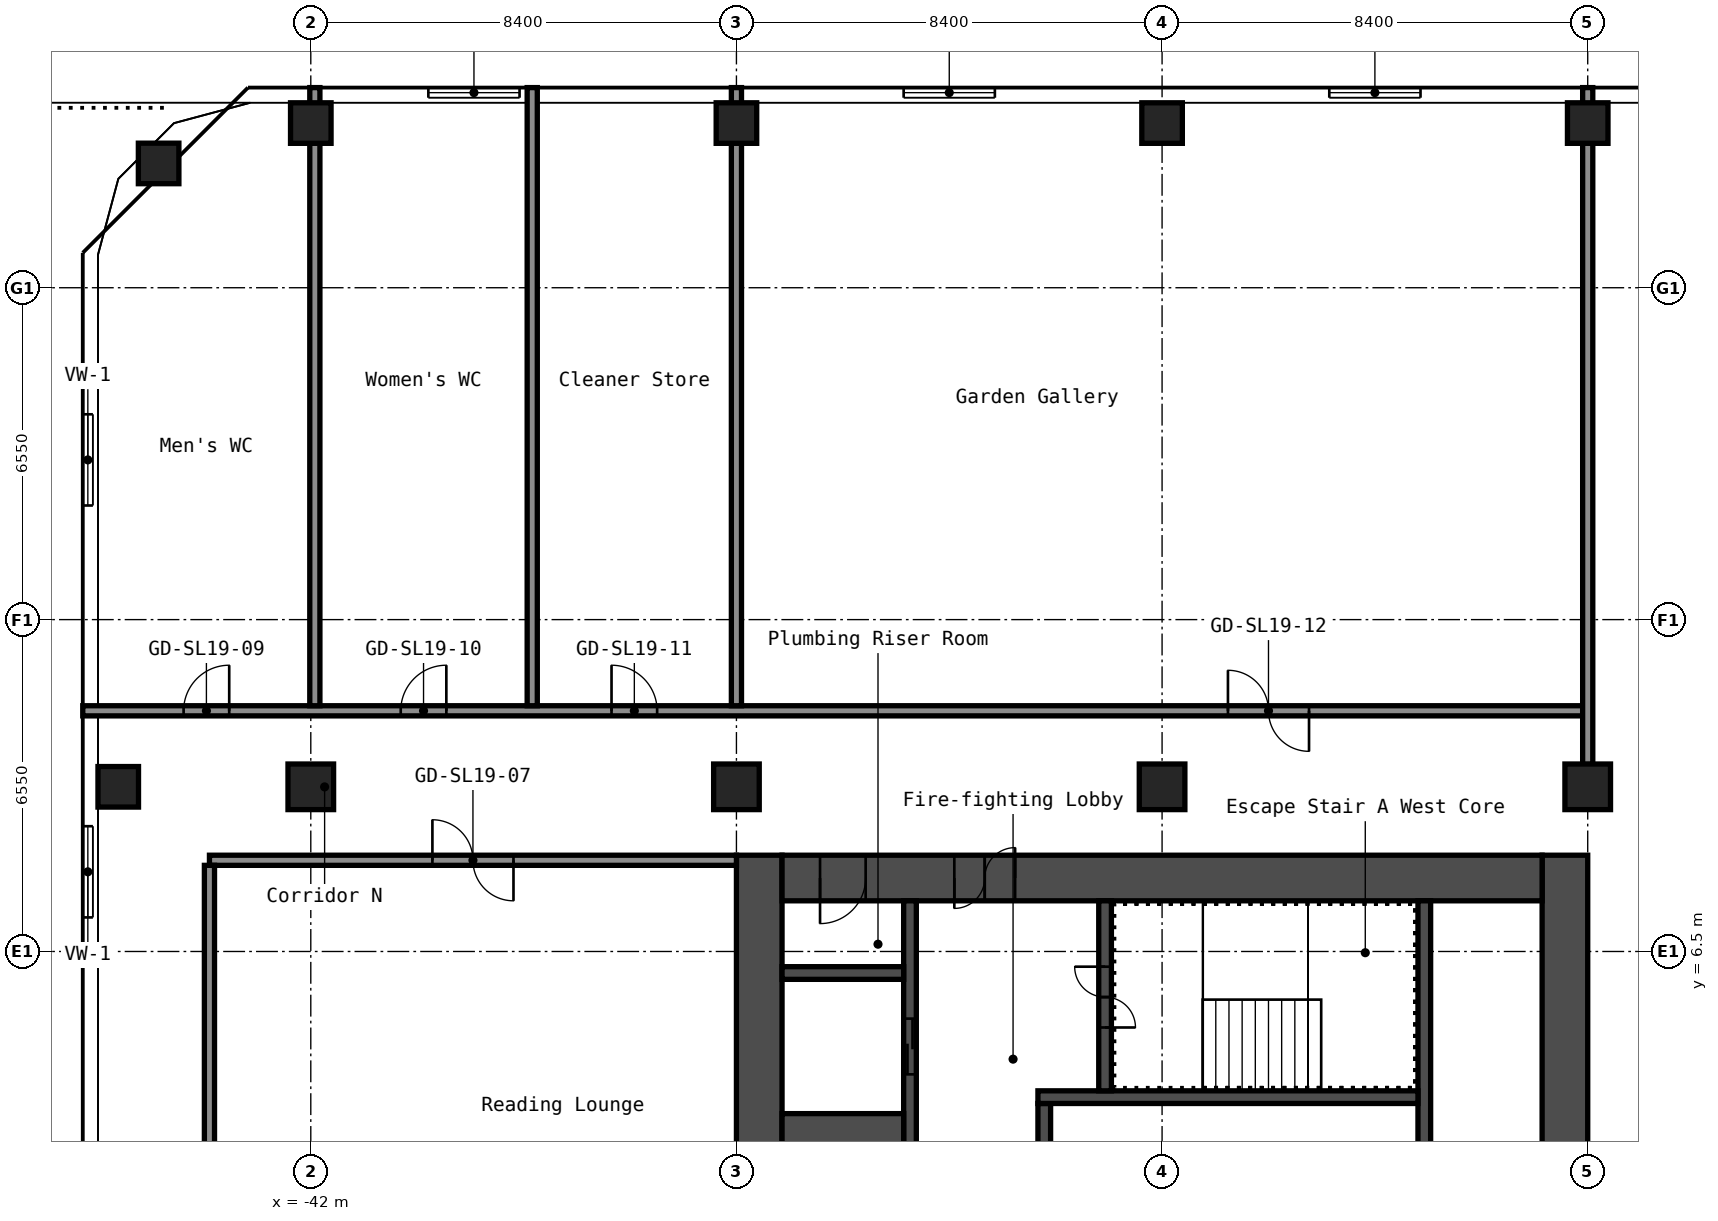
"""IFC4 building model, lengths in metres.
Left out: names, types, materials, properties, quantities, classifications, styles, units other than length and angle.
Written with IfcOpenShell. Run it as: python <this file> out.ifc"""

import sys

from ifc_helpers import new_model, si_unit, direction, frame, frame_2d, origin, origin_2d, place, context, subcontext, project, spatial, rectangle, hollow_rectangle, extrude, element, fill, save


model = new_model("IFC4")
c1 = context("Model", 3, precision=1e-05, world=origin(), true_north=direction((0.0, 1.0)))
c2 = subcontext(c1, "Body", "Model", "MODEL_VIEW")
j1 = project(units=[si_unit("LENGTHUNIT", "METRE"), si_unit("PLANEANGLEUNIT", "RADIAN")], contexts=[c1])
p1 = place(None, origin())
s1 = spatial("IfcSite", under=j1, at=p1, CompositionType="ELEMENT")
p2 = place(p1, origin())
s2 = spatial("IfcBuilding", under=s1, at=p2, CompositionType="ELEMENT")
p3 = place(p2, frame((0.0, 0.0, 69.0)))
s3 = spatial("IfcBuildingStorey", under=s2, at=p3, CompositionType="ELEMENT", Elevation=69.0)
for number, where, z_axis, x_axis in (
    (1, (-45.8, 9.75, 0.0), (0.0, 0.0, 1.0), (1.0, 0.0, 0.0)),
    (2, (-45.003, 22.053, 0.0), (0.0, 0.0, 1.0), (1.0, 0.0, 0.0)),
):
    element("IfcColumn", number, at=place(p3, frame(where, z_axis=z_axis, x_axis=x_axis)), inside=s3, PredefinedType="COLUMN", context=c2, shape_type="SweptSolid", body=[
        extrude(hollow_rectangle(XDim=0.8, YDim=0.8, WallThickness=0.032, at=origin_2d()), origin(), (0.0, 0.0, 1.0), 6.0),
    ])
p4 = place(p3, frame((-42.0, 9.75, 0.0), z_axis=(0.0, 0.0, 1.0), x_axis=(1.0, 0.0, 0.0)))
e3 = element("IfcColumn", 3, at=p4, inside=s3, PredefinedType="COLUMN", context=c2, shape_type="SweptSolid", body=[
    extrude(hollow_rectangle(XDim=0.9, YDim=0.9, WallThickness=0.036, at=origin_2d()), origin(), (0.0, 0.0, 1.0), 6.0),
])
p5 = place(p3, frame((-42.0, 22.85, 0.0), z_axis=(0.0, 0.0, 1.0), x_axis=(1.0, 0.0, 0.0)))
e4 = element("IfcColumn", 4, at=p5, inside=s3, PredefinedType="COLUMN", context=c2, shape_type="SweptSolid", body=[
    extrude(hollow_rectangle(XDim=0.8, YDim=0.8, WallThickness=0.032, at=origin_2d()), origin(), (0.0, 0.0, 1.0), 6.0),
])
p6 = place(p3, frame((-33.6, 9.75, 0.0), z_axis=(0.0, 0.0, 1.0), x_axis=(1.0, 0.0, 0.0)))
e5 = element("IfcColumn", 5, at=p6, inside=s3, PredefinedType="COLUMN", context=c2, shape_type="SweptSolid", body=[
    extrude(hollow_rectangle(XDim=0.9, YDim=0.9, WallThickness=0.036, at=origin_2d()), origin(), (0.0, 0.0, 1.0), 6.0),
])
p7 = place(p3, frame((-33.6, 22.85, 0.0), z_axis=(0.0, 0.0, 1.0), x_axis=(1.0, 0.0, 0.0)))
e6 = element("IfcColumn", 6, at=p7, inside=s3, PredefinedType="COLUMN", context=c2, shape_type="SweptSolid", body=[
    extrude(hollow_rectangle(XDim=0.8, YDim=0.8, WallThickness=0.032, at=origin_2d()), origin(), (0.0, 0.0, 1.0), 6.0),
])
p8 = place(p3, frame((-25.2, 9.75, 0.0), z_axis=(0.0, 0.0, 1.0), x_axis=(1.0, 0.0, 0.0)))
e7 = element("IfcColumn", 7, at=p8, inside=s3, PredefinedType="COLUMN", context=c2, shape_type="SweptSolid", body=[
    extrude(hollow_rectangle(XDim=0.9, YDim=0.9, WallThickness=0.036, at=origin_2d()), origin(), (0.0, 0.0, 1.0), 6.0),
])
p9 = place(p3, frame((-25.2, 22.85, 0.0), z_axis=(0.0, 0.0, 1.0), x_axis=(1.0, 0.0, 0.0)))
e8 = element("IfcColumn", 8, at=p9, inside=s3, PredefinedType="COLUMN", context=c2, shape_type="SweptSolid", body=[
    extrude(hollow_rectangle(XDim=0.8, YDim=0.8, WallThickness=0.032, at=origin_2d()), origin(), (0.0, 0.0, 1.0), 6.0),
])
p10 = place(p3, frame((-16.8, 9.75, 0.0), z_axis=(0.0, 0.0, 1.0), x_axis=(1.0, 0.0, 0.0)))
e9 = element("IfcColumn", 9, at=p10, inside=s3, PredefinedType="COLUMN", context=c2, shape_type="SweptSolid", body=[
    extrude(hollow_rectangle(XDim=0.9, YDim=0.9, WallThickness=0.036, at=origin_2d()), origin(), (0.0, 0.0, 1.0), 6.0),
])
p11 = place(p3, frame((-16.8, 22.85, 0.0), z_axis=(0.0, 0.0, 1.0), x_axis=(1.0, 0.0, 0.0)))
e10 = element("IfcColumn", 10, at=p11, inside=s3, PredefinedType="COLUMN", context=c2, shape_type="SweptSolid", body=[
    extrude(hollow_rectangle(XDim=0.8, YDim=0.8, WallThickness=0.032, at=origin_2d()), origin(), (0.0, 0.0, 1.0), 6.0),
])
p12 = place(p3, frame((-17.25, -8.4, 0.0), z_axis=(0.0, 0.0, 1.0), x_axis=(0.0, 1.0, 0.0)))
e11 = element("IfcWall", 11, at=p12, inside=s3, PredefinedType="SHEAR", context=c2, shape_type="SweptSolid", body=[
    extrude(rectangle(XDim=16.8, YDim=0.9, at=frame_2d((8.4, 0.0))), origin(), (0.0, 0.0, 1.0), 6.0),
])
p13 = place(p12, frame((7.6, 0.0, 0.0)))
e12 = element("IfcOpeningElement", 12, at=p13, cuts=e11, PredefinedType="OPENING", context=c2, shape_type="SweptSolid", body=[
    extrude(rectangle(XDim=1.2, YDim=2.1, at=frame_2d((0.6, 1.05))), frame((0.0, 0.46, 0.0), z_axis=(0.0, -1.0, 0.0), x_axis=(1.0, 0.0, 0.0)), (0.0, 0.0, 1.0), 0.92),
])
p14 = place(p3, frame((-33.15, -8.4, 0.0), z_axis=(0.0, 0.0, 1.0), x_axis=(0.0, 1.0, 0.0)))
e13 = element("IfcWall", 13, at=p14, inside=s3, PredefinedType="SHEAR", context=c2, shape_type="SweptSolid", body=[
    extrude(rectangle(XDim=16.8, YDim=0.9, at=frame_2d((8.4, 0.0))), origin(), (0.0, 0.0, 1.0), 6.0),
])
p15 = place(p3, frame((-32.7, 7.95, 0.0), z_axis=(0.0, 0.0, 1.0), x_axis=(1.0, 0.0, 0.0)))
e14 = element("IfcWall", 14, at=p15, inside=s3, PredefinedType="SHEAR", context=c2, shape_type="SweptSolid", body=[
    extrude(rectangle(XDim=15.0, YDim=0.9, at=frame_2d((7.5, 0.0))), origin(), (0.0, 0.0, 1.0), 6.0),
])
p16 = place(p15, frame((3.4, 0.0, 0.0)))
e15 = element("IfcOpeningElement", 15, at=p16, cuts=e14, PredefinedType="OPENING", context=c2, shape_type="SweptSolid", body=[
    extrude(rectangle(XDim=1.2, YDim=2.1, at=frame_2d((0.6, 1.05))), frame((0.0, 0.46, 0.0), z_axis=(0.0, -1.0, 0.0), x_axis=(1.0, 0.0, 0.0)), (0.0, 0.0, 1.0), 0.92),
])
p17 = place(p15, frame((0.75, 0.0, 0.0)))
e16 = element("IfcOpeningElement", 16, at=p17, cuts=e14, PredefinedType="OPENING", context=c2, shape_type="SweptSolid", body=[
    extrude(rectangle(XDim=0.9, YDim=2.1, at=frame_2d((0.45, 1.05))), frame((0.0, 0.46, 0.0), z_axis=(0.0, -1.0, 0.0), x_axis=(1.0, 0.0, 0.0)), (0.0, 0.0, 1.0), 0.92),
])
p18 = place(p3, frame((-20.025, 1.2, 0.0), z_axis=(0.0, 0.0, 1.0), x_axis=(0.0, 1.0, 0.0)))
e17 = element("IfcWall", 17, at=p18, inside=s3, PredefinedType="SHEAR", context=c2, shape_type="SweptSolid", body=[
    extrude(rectangle(XDim=6.3, YDim=0.25, at=frame_2d((3.15, 0.0))), origin(), (0.0, 0.0, 1.0), 6.0),
])
p19 = place(p3, frame((-27.525, 1.45, 0.0), z_axis=(0.0, 0.0, 1.0), x_axis=(0.0, 1.0, 0.0)))
e18 = element("IfcWall", 18, at=p19, inside=s3, PredefinedType="SHEAR", context=c2, shape_type="SweptSolid", body=[
    extrude(rectangle(XDim=2.05, YDim=0.25, at=frame_2d((1.025, 0.0))), origin(), (0.0, 0.0, 1.0), 6.0),
])
p20 = place(p3, frame((-27.65, 3.625, 0.0), z_axis=(0.0, 0.0, 1.0), x_axis=(1.0, 0.0, 0.0)))
e19 = element("IfcWall", 19, at=p20, inside=s3, PredefinedType="SHEAR", context=c2, shape_type="SweptSolid", body=[
    extrude(rectangle(XDim=7.5, YDim=0.25, at=frame_2d((3.75, 0.0))), origin(), (0.0, 0.0, 1.0), 6.0),
])
p21 = place(p3, frame((-26.325, 3.75, 0.0), z_axis=(0.0, 0.0, 1.0), x_axis=(0.0, 1.0, 0.0)))
e20 = element("IfcWall", 20, at=p21, inside=s3, PredefinedType="SHEAR", context=c2, shape_type="SweptSolid", body=[
    extrude(rectangle(XDim=3.75, YDim=0.25, at=frame_2d((1.875, 0.0))), origin(), (0.0, 0.0, 1.0), 6.0),
])
p22 = place(p21, frame((1.25, 0.0, 0.0)))
e21 = element("IfcOpeningElement", 21, at=p22, cuts=e20, PredefinedType="OPENING", context=c2, shape_type="SweptSolid", body=[
    extrude(rectangle(XDim=1.2, YDim=2.1, at=frame_2d((0.6, 1.05))), frame((0.0, 0.135, 0.0), z_axis=(0.0, -1.0, 0.0), x_axis=(1.0, 0.0, 0.0)), (0.0, 0.0, 1.0), 0.27),
])
p23 = place(p3, frame((-30.175, 1.45, 0.0), z_axis=(0.0, 0.0, 1.0), x_axis=(0.0, 1.0, 0.0)))
e22 = element("IfcWall", 22, at=p23, inside=s3, PredefinedType="SHEAR", context=c2, shape_type="SweptSolid", body=[
    extrude(rectangle(XDim=6.05, YDim=0.25, at=frame_2d((3.025, 0.0))), origin(), (0.0, 0.0, 1.0), 6.0),
])
p24 = place(p23, frame((2.625, 0.0, 0.0)))
e23 = element("IfcOpeningElement", 23, at=p24, cuts=e22, PredefinedType="OPENING", context=c2, shape_type="SweptSolid", body=[
    extrude(rectangle(XDim=1.1, YDim=2.1, at=frame_2d((0.55, 1.05))), frame((0.0, 0.135, 0.0), z_axis=(0.0, -1.0, 0.0), x_axis=(1.0, 0.0, 0.0)), (0.0, 0.0, 1.0), 0.27),
])
p25 = place(p3, frame((-32.7, 2.375, 0.0), z_axis=(0.0, 0.0, 1.0), x_axis=(1.0, 0.0, 0.0)))
e24 = element("IfcWall", 24, at=p25, inside=s3, PredefinedType="SHEAR", context=c2, shape_type="SweptSolid", body=[
    extrude(rectangle(XDim=2.4, YDim=1.85, at=frame_2d((1.2, 0.0))), origin(), (0.0, 0.0, 1.0), 6.0),
])
p26 = place(p3, frame((-32.7, 6.075, 0.0), z_axis=(0.0, 0.0, 1.0), x_axis=(1.0, 0.0, 0.0)))
e25 = element("IfcWall", 25, at=p26, inside=s3, PredefinedType="SHEAR", context=c2, shape_type="SweptSolid", body=[
    extrude(rectangle(XDim=2.4, YDim=0.25, at=frame_2d((1.2, 0.0))), origin(), (0.0, 0.0, 1.0), 6.0),
])
p27 = place(p3, frame((-44.0, 8.3, 0.0), z_axis=(0.0, 0.0, 1.0), x_axis=(1.0, 0.0, 0.0)))
e26 = element("IfcWall", 26, at=p27, inside=s3, PredefinedType="PARTITIONING", context=c2, shape_type="SweptSolid", body=[
    extrude(rectangle(XDim=10.4, YDim=0.2, at=frame_2d((5.2, 0.0))), origin(), (0.0, 0.0, 1.0), 6.0),
])
p28 = place(p27, frame((4.4, 0.0, 0.0)))
e27 = element("IfcOpeningElement", 27, at=p28, cuts=e26, PredefinedType="OPENING", context=c2, shape_type="SweptSolid", body=[
    extrude(rectangle(XDim=1.6, YDim=2.1, at=frame_2d((0.8, 1.05))), frame((0.0, 0.11, 0.0), z_axis=(0.0, -1.0, 0.0), x_axis=(1.0, 0.0, 0.0)), (0.0, 0.0, 1.0), 0.22),
])
p29 = place(p3, frame((-46.5, 11.25, 0.0), z_axis=(0.0, 0.0, 1.0), x_axis=(1.0, 0.0, 0.0)))
e28 = element("IfcWall", 28, at=p29, inside=s3, PredefinedType="PARTITIONING", context=c2, shape_type="SweptSolid", body=[
    extrude(rectangle(XDim=29.7, YDim=0.2, at=frame_2d((14.85, 0.0))), origin(), (0.0, 0.0, 1.0), 6.0),
])
p30 = place(p29, frame((1.99, 0.0, 0.0)))
e29 = element("IfcOpeningElement", 29, at=p30, cuts=e28, PredefinedType="OPENING", context=c2, shape_type="SweptSolid", body=[
    extrude(rectangle(XDim=0.9, YDim=2.1, at=frame_2d((0.45, 1.05))), frame((0.0, 0.11, 0.0), z_axis=(0.0, -1.0, 0.0), x_axis=(1.0, 0.0, 0.0)), (0.0, 0.0, 1.0), 0.22),
])
p31 = place(p29, frame((6.275, 0.0, 0.0)))
e30 = element("IfcOpeningElement", 30, at=p31, cuts=e28, PredefinedType="OPENING", context=c2, shape_type="SweptSolid", body=[
    extrude(rectangle(XDim=0.9, YDim=2.1, at=frame_2d((0.45, 1.05))), frame((0.0, 0.11, 0.0), z_axis=(0.0, -1.0, 0.0), x_axis=(1.0, 0.0, 0.0)), (0.0, 0.0, 1.0), 0.22),
])
p32 = place(p29, frame((10.435, 0.0, 0.0)))
e31 = element("IfcOpeningElement", 31, at=p32, cuts=e28, PredefinedType="OPENING", context=c2, shape_type="SweptSolid", body=[
    extrude(rectangle(XDim=0.9, YDim=2.1, at=frame_2d((0.45, 1.05))), frame((0.0, 0.11, 0.0), z_axis=(0.0, -1.0, 0.0), x_axis=(1.0, 0.0, 0.0)), (0.0, 0.0, 1.0), 0.22),
])
p33 = place(p29, frame((22.6, 0.0, 0.0)))
e32 = element("IfcOpeningElement", 32, at=p33, cuts=e28, PredefinedType="OPENING", context=c2, shape_type="SweptSolid", body=[
    extrude(rectangle(XDim=1.6, YDim=2.1, at=frame_2d((0.8, 1.05))), frame((0.0, 0.11, 0.0), z_axis=(0.0, -1.0, 0.0), x_axis=(1.0, 0.0, 0.0)), (0.0, 0.0, 1.0), 0.22),
])
p34 = place(p3, frame((-44.0, -8.2, 0.0), z_axis=(0.0, 0.0, 1.0), x_axis=(0.0, 1.0, 0.0)))
e33 = element("IfcWall", 33, at=p34, inside=s3, PredefinedType="PARTITIONING", context=c2, shape_type="SweptSolid", body=[
    extrude(rectangle(XDim=16.4, YDim=0.2, at=frame_2d((8.2, 0.0))), origin(), (0.0, 0.0, 1.0), 6.0),
])
for number, where, z_axis, x_axis in (
    (34, (-41.92, 11.35, 0.0), (0.0, 0.0, 1.0), (0.0, 1.0, 0.0)),
    (35, (-37.63, 11.35, 0.0), (0.0, 0.0, 1.0), (0.0, 1.0, 0.0)),
    (36, (-33.6, 11.35, 0.0), (0.0, 0.0, 1.0), (0.0, 1.0, 0.0)),
):
    element("IfcWall", number, at=place(p3, frame(where, z_axis=z_axis, x_axis=x_axis)), inside=s3, PredefinedType="PARTITIONING", context=c2, shape_type="SweptSolid", body=[
        extrude(rectangle(XDim=12.2, YDim=0.2, at=frame_2d((6.1, 0.0))), origin(), (0.0, 0.0, 1.0), 6.0),
    ])
p35 = place(p3, frame((-16.8, 10.19, 0.0), z_axis=(0.0, 0.0, 1.0), x_axis=(0.0, 1.0, 0.0)))
e37 = element("IfcWall", 37, at=p35, inside=s3, PredefinedType="PARTITIONING", context=c2, shape_type="SweptSolid", body=[
    extrude(rectangle(XDim=13.36, YDim=0.2, at=frame_2d((6.68, 0.0))), origin(), (0.0, 0.0, 1.0), 6.0),
])
p36 = place(p3, frame((-16.8, 23.45, 4.45), z_axis=(0.0, 0.0, 1.0), x_axis=(-1.0, 0.0, 0.0)))
p37 = place(p36, frame((3.3, 0.0, 0.25)))
p38 = place(p37, origin())
e38 = element("IfcWindow", 38, at=p38, inside=s3, PartitioningType="SINGLE_PANEL", PredefinedType="WINDOW", context=c2, shape_type="SweptSolid", body=[
    extrude(rectangle(XDim=1.8, YDim=0.9, at=frame_2d((0.9, 0.45))), frame((0.0, 0.03, 0.0), z_axis=(0.0, -1.0, 0.0), x_axis=(1.0, 0.0, 0.0)), (0.0, 0.0, 1.0), 0.06),
])
p39 = place(p3, frame((-25.2, 23.45, 4.45), z_axis=(0.0, 0.0, 1.0), x_axis=(-1.0, 0.0, 0.0)))
p40 = place(p39, frame((3.3, 0.0, 0.25)))
p41 = place(p40, origin())
e39 = element("IfcWindow", 39, at=p41, inside=s3, PartitioningType="SINGLE_PANEL", PredefinedType="WINDOW", context=c2, shape_type="SweptSolid", body=[
    extrude(rectangle(XDim=1.8, YDim=0.9, at=frame_2d((0.9, 0.45))), frame((0.0, 0.03, 0.0), z_axis=(0.0, -1.0, 0.0), x_axis=(1.0, 0.0, 0.0)), (0.0, 0.0, 1.0), 0.06),
])
p42 = place(p3, frame((-33.6, 23.45, 4.45), z_axis=(0.0, 0.0, 1.0), x_axis=(-1.0, 0.0, 0.0)))
p43 = place(p42, frame((4.28, 0.0, 0.25)))
p44 = place(p43, origin())
e40 = element("IfcWindow", 40, at=p44, inside=s3, PartitioningType="SINGLE_PANEL", PredefinedType="WINDOW", context=c2, shape_type="SweptSolid", body=[
    extrude(rectangle(XDim=1.8, YDim=0.9, at=frame_2d((0.9, 0.45))), frame((0.0, 0.03, 0.0), z_axis=(0.0, -1.0, 0.0), x_axis=(1.0, 0.0, 0.0)), (0.0, 0.0, 1.0), 0.06),
])
p45 = place(p3, frame((-46.4, 20.26, 4.45), z_axis=(0.0, 0.0, 1.0), x_axis=(0.0, -1.0, 0.0)))
p46 = place(p45, frame((3.157, 0.0, 0.25)))
p47 = place(p46, origin())
e41 = element("IfcWindow", 41, at=p47, inside=s3, PartitioningType="SINGLE_PANEL", PredefinedType="WINDOW", context=c2, shape_type="SweptSolid", body=[
    extrude(rectangle(XDim=1.8, YDim=0.9, at=frame_2d((0.9, 0.45))), frame((0.0, 0.03, 0.0), z_axis=(0.0, -1.0, 0.0), x_axis=(1.0, 0.0, 0.0)), (0.0, 0.0, 1.0), 0.06),
])
p48 = place(p3, frame((-46.4, 12.145, 4.45), z_axis=(0.0, 0.0, 1.0), x_axis=(0.0, -1.0, 0.0)))
p49 = place(p48, frame((3.172, 0.0, 0.25)))
p50 = place(p49, origin())
e42 = element("IfcWindow", 42, at=p50, inside=s3, PartitioningType="SINGLE_PANEL", PredefinedType="WINDOW", context=c2, shape_type="SweptSolid", body=[
    extrude(rectangle(XDim=1.8, YDim=0.9, at=frame_2d((0.9, 0.45))), frame((0.0, 0.03, 0.0), z_axis=(0.0, -1.0, 0.0), x_axis=(1.0, 0.0, 0.0)), (0.0, 0.0, 1.0), 0.06),
])
p51 = place(p16, origin())
e43 = element("IfcDoor", 43, at=p51, inside=s3, OperationType="DOUBLE_DOOR_SINGLE_SWING", PredefinedType="DOOR", context=c2, shape_type="SweptSolid", body=[
    extrude(rectangle(XDim=1.2, YDim=2.1, at=frame_2d((0.6, 1.05))), frame((0.0, 0.025, 0.0), z_axis=(0.0, -1.0, 0.0), x_axis=(1.0, 0.0, 0.0)), (0.0, 0.0, 1.0), 0.05),
])
fill(e15, e43)
p52 = place(p17, origin())
e44 = element("IfcDoor", 44, at=p52, inside=s3, OperationType="SINGLE_SWING_LEFT", PredefinedType="DOOR", context=c2, shape_type="SweptSolid", body=[
    extrude(rectangle(XDim=0.9, YDim=2.1, at=frame_2d((0.45, 1.05))), frame((0.0, 0.025, 0.0), z_axis=(0.0, -1.0, 0.0), x_axis=(1.0, 0.0, 0.0)), (0.0, 0.0, 1.0), 0.05),
])
fill(e16, e44)
p53 = place(p22, origin())
e45 = element("IfcDoor", 45, at=p53, inside=s3, OperationType="DOUBLE_DOOR_SINGLE_SWING", PredefinedType="DOOR", context=c2, shape_type="SweptSolid", body=[
    extrude(rectangle(XDim=1.2, YDim=2.1, at=frame_2d((0.6, 1.05))), frame((0.0, 0.025, 0.0), z_axis=(0.0, -1.0, 0.0), x_axis=(1.0, 0.0, 0.0)), (0.0, 0.0, 1.0), 0.05),
])
fill(e21, e45)
p54 = place(p24, origin())
e46 = element("IfcDoor", 46, at=p54, inside=s3, OperationType="DOUBLE_DOOR_SLIDING", PredefinedType="DOOR", context=c2, shape_type="SweptSolid", body=[
    extrude(rectangle(XDim=1.1, YDim=2.1, at=frame_2d((0.55, 1.05))), frame((0.0, 0.025, 0.0), z_axis=(0.0, -1.0, 0.0), x_axis=(1.0, 0.0, 0.0)), (0.0, 0.0, 1.0), 0.05),
])
fill(e23, e46)
p55 = place(p28, origin())
e47 = element("IfcDoor", 47, at=p55, inside=s3, OperationType="DOUBLE_DOOR_SINGLE_SWING", PredefinedType="DOOR", context=c2, shape_type="SweptSolid", body=[
    extrude(rectangle(XDim=1.6, YDim=2.1, at=frame_2d((0.8, 1.05))), frame((0.0, 0.025, 0.0), z_axis=(0.0, -1.0, 0.0), x_axis=(1.0, 0.0, 0.0)), (0.0, 0.0, 1.0), 0.05),
])
fill(e27, e47)
p56 = place(p30, origin())
e48 = element("IfcDoor", 48, at=p56, inside=s3, OperationType="SINGLE_SWING_LEFT", PredefinedType="DOOR", context=c2, shape_type="SweptSolid", body=[
    extrude(rectangle(XDim=0.9, YDim=2.1, at=frame_2d((0.45, 1.05))), frame((0.0, 0.025, 0.0), z_axis=(0.0, -1.0, 0.0), x_axis=(1.0, 0.0, 0.0)), (0.0, 0.0, 1.0), 0.05),
])
fill(e29, e48)
p57 = place(p31, origin())
e49 = element("IfcDoor", 49, at=p57, inside=s3, OperationType="SINGLE_SWING_LEFT", PredefinedType="DOOR", context=c2, shape_type="SweptSolid", body=[
    extrude(rectangle(XDim=0.9, YDim=2.1, at=frame_2d((0.45, 1.05))), frame((0.0, 0.025, 0.0), z_axis=(0.0, -1.0, 0.0), x_axis=(1.0, 0.0, 0.0)), (0.0, 0.0, 1.0), 0.05),
])
fill(e30, e49)
p58 = place(p32, origin())
e50 = element("IfcDoor", 50, at=p58, inside=s3, OperationType="SINGLE_SWING_RIGHT", PredefinedType="DOOR", context=c2, shape_type="SweptSolid", body=[
    extrude(rectangle(XDim=0.9, YDim=2.1, at=frame_2d((0.45, 1.05))), frame((0.0, 0.025, 0.0), z_axis=(0.0, -1.0, 0.0), x_axis=(1.0, 0.0, 0.0)), (0.0, 0.0, 1.0), 0.05),
])
fill(e31, e50)
p59 = place(p33, origin())
e51 = element("IfcDoor", 51, at=p59, inside=s3, OperationType="DOUBLE_DOOR_SINGLE_SWING", PredefinedType="DOOR", context=c2, shape_type="SweptSolid", body=[
    extrude(rectangle(XDim=1.6, YDim=2.1, at=frame_2d((0.8, 1.05))), frame((0.0, 0.025, 0.0), z_axis=(0.0, -1.0, 0.0), x_axis=(1.0, 0.0, 0.0)), (0.0, 0.0, 1.0), 0.05),
])
fill(e32, e51)
save(model, sys.argv[1])
